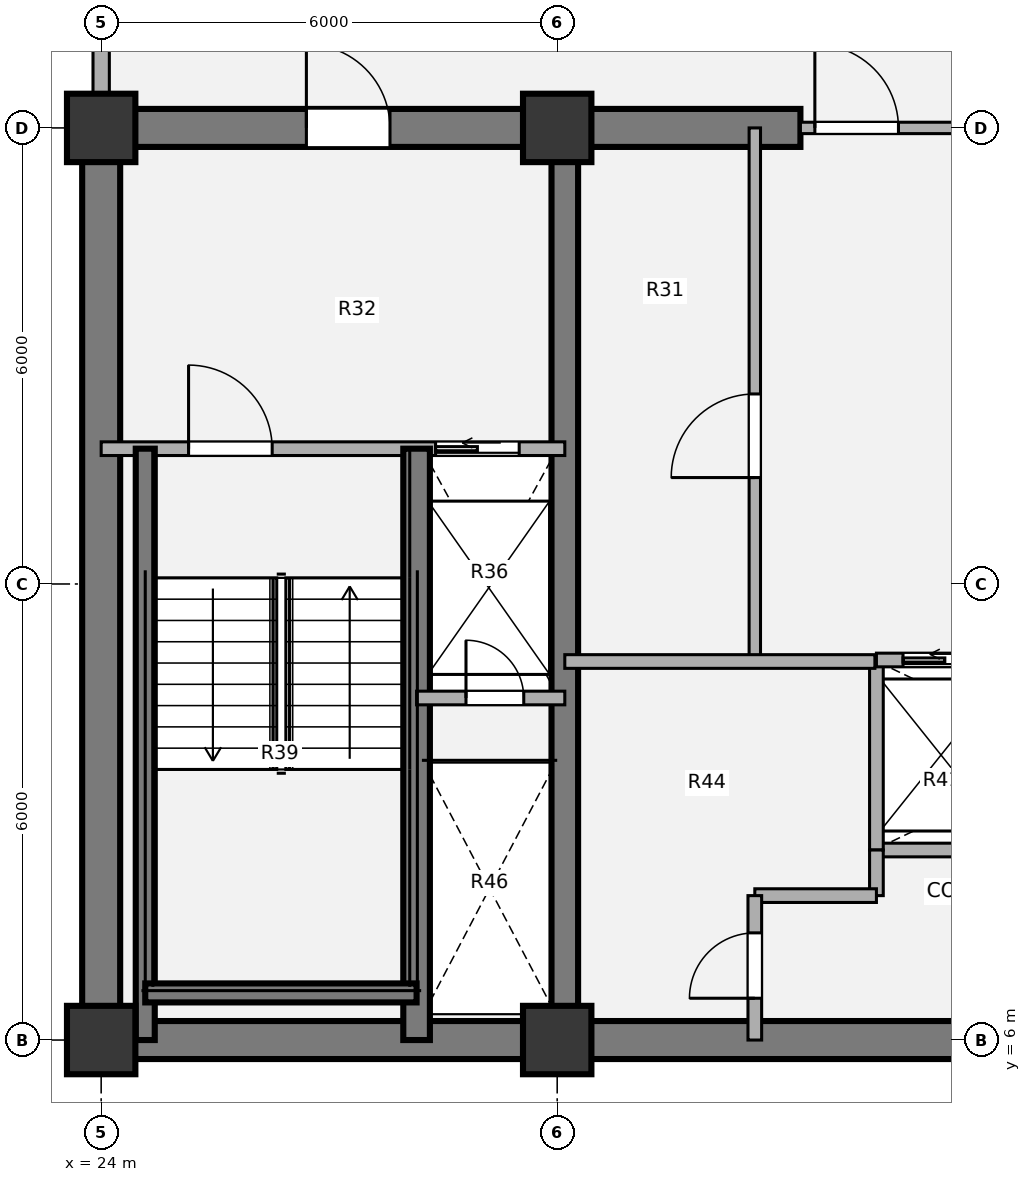
"""IFC4 building model, lengths in metres.
Left out: names, types, materials, properties, quantities, classifications, styles, units other than length and angle.
Written with IfcOpenShell. Run it as: python <this file> out.ifc"""

import sys

from ifc_helpers import new_model, si_unit, direction, frame, frame_2d, origin, origin_2d, place, context, subcontext, project, spatial, rectangle, extrude, source, transform, mapped, element, fill, save


model = new_model("IFC4")
c1 = context("Model", 3, precision=1e-05, world=origin(), true_north=direction((0.0, 1.0)))
c2 = subcontext(c1, "Body", "Model", "MODEL_VIEW")
j1 = project(units=[si_unit("LENGTHUNIT", "METRE"), si_unit("PLANEANGLEUNIT", "RADIAN")], contexts=[c1])
p1 = place(None, origin())
s1 = spatial("IfcSite", under=j1, at=p1, CompositionType="ELEMENT")
p2 = place(p1, origin())
s2 = spatial("IfcBuilding", under=s1, at=p2, CompositionType="ELEMENT")
p3 = place(p2, frame((0.0, 0.0, 127.62)))
s3 = spatial("IfcBuildingStorey", under=s2, at=p3, CompositionType="ELEMENT", Elevation=127.62)
m1 = source(origin(), c2, "Body", "SweptSolid", [
    extrude(rectangle(XDim=0.9, YDim=0.9, at=origin_2d()), origin(), (0.0, 0.0, 1.0), 3.78),
])
for number, where, z_axis, x_axis in (
    (1, (24.0, 6.0, 0.0), (0.0, 0.0, 1.0), (1.0, 0.0, 0.0)),
    (2, (30.0, 6.0, 0.0), (0.0, 0.0, 1.0), (1.0, 0.0, 0.0)),
    (3, (24.0, 18.0, 0.0), (0.0, 0.0, 1.0), (1.0, 0.0, 0.0)),
    (4, (30.0, 18.0, 0.0), (0.0, 0.0, 1.0), (1.0, 0.0, 0.0)),
):
    element("IfcColumn", number, at=place(p3, frame(where, z_axis=z_axis, x_axis=x_axis)), inside=s3, PredefinedType="COLUMN", context=c2, shape_type="MappedRepresentation", body=[
        mapped(m1, transform((0.0, 0.0, 0.0), x_axis=(1.0, 0.0, 0.0), y_axis=(0.0, 1.0, 0.0), z_axis=(0.0, 0.0, 1.0), scale=1.0)),
    ])
p4 = place(p3, frame((48.25, 6.0, 0.0), z_axis=(0.0, 0.0, 1.0), x_axis=(-1.0, 0.0, 0.0)))
e5 = element("IfcWall", 5, at=p4, inside=s3, PredefinedType="SHEAR", context=c2, shape_type="SweptSolid", body=[
    extrude(rectangle(XDim=24.5, YDim=0.5, at=frame_2d((12.25, 0.0))), origin(), (0.0, 0.0, 1.0), 3.78),
])
p5 = place(p3, frame((24.0, 6.0, 0.0), z_axis=(0.0, 0.0, 1.0), x_axis=(0.0, 1.0, 0.0)))
e6 = element("IfcWall", 6, at=p5, inside=s3, PredefinedType="SHEAR", context=c2, shape_type="SweptSolid", body=[
    extrude(rectangle(XDim=12.0, YDim=0.5, at=frame_2d((6.0, 0.0))), origin(), (0.0, 0.0, 1.0), 3.78),
])
p6 = place(p3, frame((23.75, 18.0, 0.0), z_axis=(0.0, 0.0, 1.0), x_axis=(1.0, 0.0, 0.0)))
e7 = element("IfcWall", 7, at=p6, inside=s3, PredefinedType="SHEAR", context=c2, shape_type="SweptSolid", body=[
    extrude(rectangle(XDim=9.45, YDim=0.5, at=frame_2d((4.725, 0.0))), origin(), (0.0, 0.0, 1.0), 3.78),
])
p7 = place(p6, frame((2.95, 0.0, 0.0)))
e8 = element("IfcOpeningElement", 8, at=p7, cuts=e7, PredefinedType="OPENING", context=c2, shape_type="SweptSolid", body=[
    extrude(rectangle(XDim=1.1, YDim=2.1, at=origin_2d()), frame((0.55, 0.26, 1.05), z_axis=(0.0, -1.0, 0.0), x_axis=(1.0, 0.0, 0.0)), (0.0, 0.0, 1.0), 0.52),
])
p8 = place(p3, frame((30.1, 6.0, 0.0), z_axis=(0.0, 0.0, 1.0), x_axis=(0.0, 1.0, 0.0)))
e9 = element("IfcWall", 9, at=p8, inside=s3, PredefinedType="SHEAR", context=c2, shape_type="SweptSolid", body=[
    extrude(rectangle(XDim=12.0, YDim=0.35, at=frame_2d((6.0, 0.0))), origin(), (0.0, 0.0, 1.0), 3.78),
])
p9 = place(p3, frame((24.0, 18.43, 0.0), z_axis=(0.0, 0.0, 1.0), x_axis=(0.0, 1.0, 0.0)))
e10 = element("IfcWall", 10, at=p9, inside=s3, PredefinedType="SOLIDWALL", context=c2, shape_type="SweptSolid", body=[
    extrude(rectangle(XDim=2.62, YDim=0.215, at=frame_2d((1.31, 0.0))), origin(), (0.0, 0.0, 1.0), 3.53),
])
p10 = place(p3, frame((32.6, 11.0, 0.0), z_axis=(0.0, 0.0, 1.0), x_axis=(0.0, 1.0, 0.0)))
e11 = element("IfcWall", 11, at=p10, inside=s3, PredefinedType="PARTITIONING", context=c2, shape_type="SweptSolid", body=[
    extrude(rectangle(XDim=7.0, YDim=0.15, at=frame_2d((3.5, 0.0))), origin(), (0.0, 0.0, 1.0), 3.5),
])
p11 = place(p10, frame((2.4, 0.0, 0.0)))
e12 = element("IfcOpeningElement", 12, at=p11, cuts=e11, PredefinedType="OPENING", context=c2, shape_type="SweptSolid", body=[
    extrude(rectangle(XDim=1.1, YDim=2.1, at=origin_2d()), frame((0.55, 0.085, 1.05), z_axis=(0.0, -1.0, 0.0), x_axis=(1.0, 0.0, 0.0)), (0.0, 0.0, 1.0), 0.17),
])
p12 = place(p3, frame((34.2, 8.5, 0.0), z_axis=(0.0, 0.0, 1.0), x_axis=(1.0, 0.0, 0.0)))
e13 = element("IfcWall", 13, at=p12, inside=s3, PredefinedType="PARTITIONING", context=c2, shape_type="SweptSolid", body=[
    extrude(rectangle(XDim=5.15, YDim=0.18, at=frame_2d((2.575, 0.0))), origin(), (0.0, 0.0, 1.0), 3.5),
])
p13 = place(p3, frame((34.2, 8.5, 0.0), z_axis=(0.0, 0.0, 1.0), x_axis=(0.0, 1.0, 0.0)))
e14 = element("IfcWall", 14, at=p13, inside=s3, PredefinedType="PARTITIONING", context=c2, shape_type="SweptSolid", body=[
    extrude(rectangle(XDim=2.5, YDim=0.18, at=frame_2d((1.25, 0.0))), origin(), (0.0, 0.0, 1.0), 3.5),
])
p14 = place(p3, frame((30.1, 10.98, 0.0), z_axis=(0.0, 0.0, 1.0), x_axis=(1.0, 0.0, 0.0)))
e15 = element("IfcWall", 15, at=p14, inside=s3, PredefinedType="PARTITIONING", context=c2, shape_type="SweptSolid", body=[
    extrude(rectangle(XDim=4.08, YDim=0.18, at=frame_2d((2.04, 0.0))), origin(), (0.0, 0.0, 1.0), 3.5),
])
p15 = place(p3, frame((34.2, 7.9, 0.0), z_axis=(0.0, 0.0, 1.0), x_axis=(0.0, 1.0, 0.0)))
e16 = element("IfcWall", 16, at=p15, inside=s3, PredefinedType="PARTITIONING", context=c2, shape_type="SweptSolid", body=[
    extrude(rectangle(XDim=0.6, YDim=0.18, at=frame_2d((0.3, 0.0))), origin(), (0.0, 0.0, 1.0), 3.5),
])
p16 = place(p3, frame((32.6, 7.9, 0.0), z_axis=(0.0, 0.0, 1.0), x_axis=(1.0, 0.0, 0.0)))
e17 = element("IfcWall", 17, at=p16, inside=s3, PredefinedType="PARTITIONING", context=c2, shape_type="SweptSolid", body=[
    extrude(rectangle(XDim=1.6, YDim=0.18, at=frame_2d((0.8, 0.0))), origin(), (0.0, 0.0, 1.0), 3.5),
])
p17 = place(p3, frame((32.6, 6.0, 0.0), z_axis=(0.0, 0.0, 1.0), x_axis=(0.0, 1.0, 0.0)))
e18 = element("IfcWall", 18, at=p17, inside=s3, PredefinedType="PARTITIONING", context=c2, shape_type="SweptSolid", body=[
    extrude(rectangle(XDim=1.9, YDim=0.18, at=frame_2d((0.95, 0.0))), origin(), (0.0, 0.0, 1.0), 3.5),
])
p18 = place(p17, frame((0.55, 0.0, 0.0)))
e19 = element("IfcOpeningElement", 19, at=p18, cuts=e18, PredefinedType="OPENING", context=c2, shape_type="SweptSolid", body=[
    extrude(rectangle(XDim=0.86, YDim=2.1, at=origin_2d()), frame((0.43, 0.1, 1.05), z_axis=(0.0, -1.0, 0.0), x_axis=(1.0, 0.0, 0.0)), (0.0, 0.0, 1.0), 0.2),
])
p19 = place(p3, frame((33.2, 18.0, 0.0), z_axis=(0.0, 0.0, 1.0), x_axis=(1.0, 0.0, 0.0)))
e20 = element("IfcWall", 20, at=p19, inside=s3, PredefinedType="PARTITIONING", context=c2, shape_type="SweptSolid", body=[
    extrude(rectangle(XDim=5.6, YDim=0.15, at=frame_2d((2.8, 0.0))), origin(), (0.0, 0.0, 1.0), 2.315),
])
p20 = place(p19, frame((0.19, 0.0, 0.0)))
e21 = element("IfcOpeningElement", 21, at=p20, cuts=e20, PredefinedType="OPENING", context=c2, shape_type="SweptSolid", body=[
    extrude(rectangle(XDim=1.1, YDim=2.1, at=origin_2d()), frame((0.55, 0.085, 1.05), z_axis=(0.0, -1.0, 0.0), x_axis=(1.0, 0.0, 0.0)), (0.0, 0.0, 1.0), 0.17),
])
p21 = place(p19, frame((4.31, 0.0, 0.0)))
e22 = element("IfcOpeningElement", 22, at=p21, cuts=e20, PredefinedType="OPENING", context=c2, shape_type="SweptSolid", body=[
    extrude(rectangle(XDim=1.1, YDim=2.1, at=origin_2d()), frame((0.55, 0.085, 1.05), z_axis=(0.0, -1.0, 0.0), x_axis=(1.0, 0.0, 0.0)), (0.0, 0.0, 1.0), 0.17),
])
p22 = place(p3, frame((24.0, 13.78, 0.0), z_axis=(0.0, 0.0, 1.0), x_axis=(1.0, 0.0, 0.0)))
e23 = element("IfcWall", 23, at=p22, inside=s3, PredefinedType="PARTITIONING", context=c2, shape_type="SweptSolid", body=[
    extrude(rectangle(XDim=6.1, YDim=0.18, at=frame_2d((3.05, 0.0))), origin(), (0.0, 0.0, 1.0), 3.5),
])
p23 = place(p22, frame((1.15, 0.0, 0.0)))
e24 = element("IfcOpeningElement", 24, at=p23, cuts=e23, PredefinedType="OPENING", context=c2, shape_type="SweptSolid", body=[
    extrude(rectangle(XDim=1.1, YDim=2.1, at=origin_2d()), frame((0.55, 0.1, 1.05), z_axis=(0.0, -1.0, 0.0), x_axis=(1.0, 0.0, 0.0)), (0.0, 0.0, 1.0), 0.2),
])
p24 = place(p22, frame((4.4, 0.0, 0.0)))
e25 = element("IfcOpeningElement", 25, at=p24, cuts=e23, PredefinedType="OPENING", context=c2, shape_type="SweptSolid", body=[
    extrude(rectangle(XDim=1.1, YDim=2.1, at=origin_2d()), frame((0.55, 0.1, 1.05), z_axis=(0.0, -1.0, 0.0), x_axis=(1.0, 0.0, 0.0)), (0.0, 0.0, 1.0), 0.2),
])
p25 = place(p3, frame((28.15, 6.0, 0.0), z_axis=(0.0, 0.0, 1.0), x_axis=(0.0, 1.0, 0.0)))
e26 = element("IfcWall", 26, at=p25, inside=s3, PredefinedType="SHEAR", context=c2, shape_type="SweptSolid", body=[
    extrude(rectangle(XDim=7.78, YDim=0.35, at=frame_2d((3.89, 0.0))), origin(), (0.0, 0.0, 1.0), 3.85),
])
p26 = place(p3, frame((24.58, 6.0, 0.0), z_axis=(0.0, 0.0, 1.0), x_axis=(0.0, 1.0, 0.0)))
e27 = element("IfcWall", 27, at=p26, inside=s3, PredefinedType="SHEAR", context=c2, shape_type="SweptSolid", body=[
    extrude(rectangle(XDim=7.78, YDim=0.25, at=frame_2d((3.89, 0.0))), origin(), (0.0, 0.0, 1.0), 3.85),
])
p27 = place(p3, frame((24.58, 6.62, 0.0), z_axis=(0.0, 0.0, 1.0), x_axis=(1.0, 0.0, 0.0)))
e28 = element("IfcWall", 28, at=p27, inside=s3, PredefinedType="SHEAR", context=c2, shape_type="SweptSolid", body=[
    extrude(rectangle(XDim=3.57, YDim=0.25, at=frame_2d((1.785, 0.0))), origin(), (0.0, 0.0, 1.0), 3.85),
])
p28 = place(p3, frame((28.15, 10.5, 0.0), z_axis=(0.0, 0.0, 1.0), x_axis=(1.0, 0.0, 0.0)))
e29 = element("IfcWall", 29, at=p28, inside=s3, PredefinedType="PARTITIONING", context=c2, shape_type="SweptSolid", body=[
    extrude(rectangle(XDim=1.95, YDim=0.18, at=frame_2d((0.975, 0.0))), origin(), (0.0, 0.0, 1.0), 3.5),
])
p29 = place(p28, frame((0.65, 0.0, 0.0)))
e30 = element("IfcOpeningElement", 30, at=p29, cuts=e29, PredefinedType="OPENING", context=c2, shape_type="SweptSolid", body=[
    extrude(rectangle(XDim=0.76, YDim=2.05, at=origin_2d()), frame((0.38, 0.1, 1.025), z_axis=(0.0, -1.0, 0.0), x_axis=(1.0, 0.0, 0.0)), (0.0, 0.0, 1.0), 0.2),
])
p30 = place(p3, frame((34.2, 11.0, 0.0), z_axis=(0.0, 0.0, 1.0), x_axis=(1.0, 0.0, 0.0)))
e31 = element("IfcWall", 31, at=p30, inside=s3, PredefinedType="PARTITIONING", context=c2, shape_type="SweptSolid", body=[
    extrude(rectangle(XDim=5.15, YDim=0.18, at=frame_2d((2.575, 0.0))), origin(), (0.0, 0.0, 1.0), 3.5),
])
p31 = place(p30, frame((0.35, 0.0, 0.0)))
e32 = element("IfcOpeningElement", 32, at=p31, cuts=e31, PredefinedType="OPENING", context=c2, shape_type="SweptSolid", body=[
    extrude(rectangle(XDim=1.1, YDim=2.1, at=origin_2d()), frame((0.55, 0.1, 1.05), z_axis=(0.0, -1.0, 0.0), x_axis=(1.0, 0.0, 0.0)), (0.0, 0.0, 1.0), 0.2),
])
p32 = place(p30, frame((2.05, 0.0, 0.0)))
e33 = element("IfcOpeningElement", 33, at=p32, cuts=e31, PredefinedType="OPENING", context=c2, shape_type="SweptSolid", body=[
    extrude(rectangle(XDim=1.1, YDim=2.1, at=origin_2d()), frame((0.55, 0.1, 1.05), z_axis=(0.0, -1.0, 0.0), x_axis=(1.0, 0.0, 0.0)), (0.0, 0.0, 1.0), 0.2),
])
p33 = place(p30, frame((3.7, 0.0, 0.0)))
e34 = element("IfcOpeningElement", 34, at=p33, cuts=e31, PredefinedType="OPENING", context=c2, shape_type="SweptSolid", body=[
    extrude(rectangle(XDim=1.1, YDim=2.1, at=origin_2d()), frame((0.55, 0.1, 1.05), z_axis=(0.0, -1.0, 0.0), x_axis=(1.0, 0.0, 0.0)), (0.0, 0.0, 1.0), 0.2),
])
m2 = source(origin(), c2, "Body", "SweptSolid", [
    extrude(rectangle(XDim=1.1, YDim=2.1, at=origin_2d()), frame((0.55, 0.025, 1.05), z_axis=(0.0, -1.0, 0.0), x_axis=(1.0, 0.0, 0.0)), (0.0, 0.0, 1.0), 0.05),
])
p34 = place(p11, origin())
e35 = element("IfcDoor", 35, at=p34, inside=s3, OperationType="SINGLE_SWING_LEFT", PredefinedType="DOOR", context=c2, shape_type="MappedRepresentation", body=[
    mapped(m2, transform((0.0, 0.0, 0.0), x_axis=(1.0, 0.0, 0.0), y_axis=(0.0, 1.0, 0.0), z_axis=(0.0, 0.0, 1.0), scale=1.0)),
])
fill(e12, e35)
m3 = source(origin(), c2, "Body", "SweptSolid", [
    extrude(rectangle(XDim=0.86, YDim=2.1, at=origin_2d()), frame((0.43, 0.025, 1.05), z_axis=(0.0, -1.0, 0.0), x_axis=(1.0, 0.0, 0.0)), (0.0, 0.0, 1.0), 0.05),
])
p35 = place(p18, origin())
e36 = element("IfcDoor", 36, at=p35, inside=s3, OperationType="SINGLE_SWING_LEFT", PredefinedType="DOOR", context=c2, shape_type="MappedRepresentation", body=[
    mapped(m3, transform((0.0, 0.0, 0.0), x_axis=(1.0, 0.0, 0.0), y_axis=(0.0, 1.0, 0.0), z_axis=(0.0, 0.0, 1.0), scale=1.0)),
])
fill(e19, e36)
m4 = source(origin(), c2, "Body", "SweptSolid", [
    extrude(rectangle(XDim=1.1, YDim=2.1, at=origin_2d()), frame((0.55, 0.025, 1.05), z_axis=(0.0, -1.0, 0.0), x_axis=(1.0, 0.0, 0.0)), (0.0, 0.0, 1.0), 0.05),
])
p36 = place(p20, origin())
e37 = element("IfcDoor", 37, at=p36, inside=s3, OperationType="SINGLE_SWING_LEFT", PredefinedType="DOOR", context=c2, shape_type="MappedRepresentation", body=[
    mapped(m4, transform((0.0, 0.0, 0.0), x_axis=(1.0, 0.0, 0.0), y_axis=(0.0, 1.0, 0.0), z_axis=(0.0, 0.0, 1.0), scale=1.0)),
])
fill(e21, e37)
m5 = source(origin(), c2, "Body", "SweptSolid", [
    extrude(rectangle(XDim=1.1, YDim=2.1, at=origin_2d()), frame((0.55, 0.025, 1.05), z_axis=(0.0, -1.0, 0.0), x_axis=(1.0, 0.0, 0.0)), (0.0, 0.0, 1.0), 0.05),
])
p37 = place(p23, origin())
e38 = element("IfcDoor", 38, at=p37, inside=s3, OperationType="SINGLE_SWING_LEFT", PredefinedType="DOOR", context=c2, shape_type="MappedRepresentation", body=[
    mapped(m5, transform((0.0, 0.0, 0.0), x_axis=(1.0, 0.0, 0.0), y_axis=(0.0, 1.0, 0.0), z_axis=(0.0, 0.0, 1.0), scale=1.0)),
])
fill(e24, e38)
m6 = source(origin(), c2, "Body", "SweptSolid", [
    extrude(rectangle(XDim=1.1, YDim=2.1, at=origin_2d()), frame((0.55, 0.025, 1.05), z_axis=(0.0, -1.0, 0.0), x_axis=(1.0, 0.0, 0.0)), (0.0, 0.0, 1.0), 0.05),
])
p38 = place(p24, origin())
e39 = element("IfcDoor", 39, at=p38, inside=s3, OperationType="SLIDING_TO_LEFT", PredefinedType="DOOR", context=c2, shape_type="MappedRepresentation", body=[
    mapped(m6, transform((0.0, 0.0, 0.0), x_axis=(1.0, 0.0, 0.0), y_axis=(0.0, 1.0, 0.0), z_axis=(0.0, 0.0, 1.0), scale=1.0)),
])
fill(e25, e39)
m7 = source(origin(), c2, "Body", "SweptSolid", [
    extrude(rectangle(XDim=0.76, YDim=2.05, at=origin_2d()), frame((0.38, 0.025, 1.025), z_axis=(0.0, -1.0, 0.0), x_axis=(1.0, 0.0, 0.0)), (0.0, 0.0, 1.0), 0.05),
])
p39 = place(p29, origin())
e40 = element("IfcDoor", 40, at=p39, inside=s3, OperationType="SINGLE_SWING_LEFT", PredefinedType="DOOR", context=c2, shape_type="MappedRepresentation", body=[
    mapped(m7, transform((0.0, 0.0, 0.0), x_axis=(1.0, 0.0, 0.0), y_axis=(0.0, 1.0, 0.0), z_axis=(0.0, 0.0, 1.0), scale=1.0)),
])
fill(e30, e40)
p40 = place(p7, origin())
e41 = element("IfcDoor", 41, at=p40, inside=s3, OperationType="SINGLE_SWING_LEFT", PredefinedType="DOOR", context=c2, shape_type="MappedRepresentation", body=[
    mapped(m4, transform((0.0, 0.0, 0.0), x_axis=(1.0, 0.0, 0.0), y_axis=(0.0, 1.0, 0.0), z_axis=(0.0, 0.0, 1.0), scale=1.0)),
])
fill(e8, e41)
p41 = place(p31, origin())
e42 = element("IfcDoor", 42, at=p41, inside=s3, OperationType="SLIDING_TO_LEFT", PredefinedType="DOOR", context=c2, shape_type="MappedRepresentation", body=[
    mapped(m6, transform((0.0, 0.0, 0.0), x_axis=(1.0, 0.0, 0.0), y_axis=(0.0, 1.0, 0.0), z_axis=(0.0, 0.0, 1.0), scale=1.0)),
])
fill(e32, e42)
save(model, sys.argv[1])
